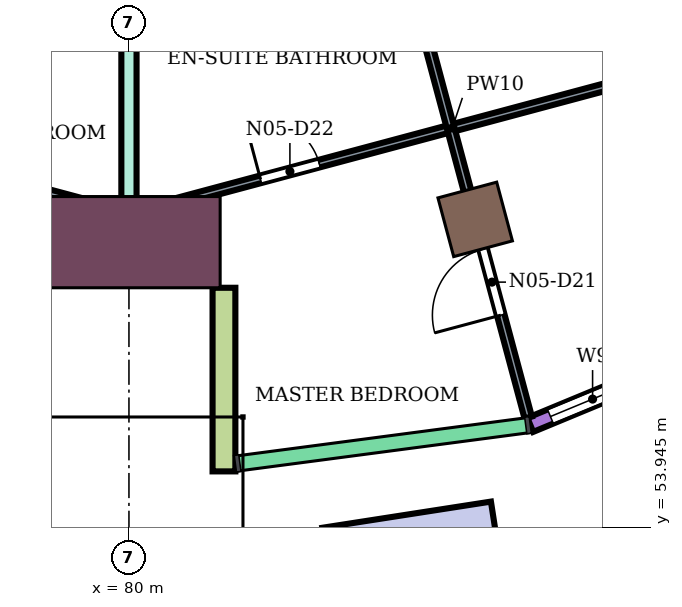
"""IFC4 building model, lengths in metres.
Left out: names, types, materials, properties, quantities, classifications, styles, units other than length and angle.
Written with IfcOpenShell. Run it as: python <this file> out.ifc"""

import sys

from ifc_helpers import new_model, si_unit, direction, frame, frame_2d, origin, origin_2d, place, context, subcontext, project, spatial, rectangle, extrude, element, fill, save


model = new_model("IFC4")
c1 = context("Model", 3, precision=1e-05, world=origin(), true_north=direction((0.0, 1.0)))
c2 = subcontext(c1, "Body", "Model", "MODEL_VIEW")
j1 = project(units=[si_unit("LENGTHUNIT", "METRE"), si_unit("PLANEANGLEUNIT", "RADIAN")], contexts=[c1])
p1 = place(None, origin())
s1 = spatial("IfcSite", under=j1, at=p1, CompositionType="ELEMENT")
p2 = place(p1, origin())
s2 = spatial("IfcBuilding", under=s1, at=p2, CompositionType="ELEMENT")
p3 = place(p2, frame((0.0, 0.0, 314.9)))
s3 = spatial("IfcBuildingStorey", under=s2, at=p3, CompositionType="ELEMENT", Elevation=314.9)
p4 = place(p3, frame((84.555, 58.0, 0.0), z_axis=(0.0, 0.0, 1.0), x_axis=(0.258819045103, -0.965925826289, 0.0)))
e1 = element("IfcColumn", 1, at=p4, inside=s3, PredefinedType="COLUMN", context=c2, shape_type="SweptSolid", body=[
    extrude(rectangle(XDim=0.8, YDim=0.8, at=origin_2d()), origin(), (0.0, 0.0, 1.0), 4.4),
])
p5 = place(p3, frame((80.0, 57.7, 0.0), z_axis=(0.0, 0.0, 1.0), x_axis=(0.0, -1.0, 0.0)))
e2 = element("IfcColumn", 2, at=p5, inside=s3, PredefinedType="COLUMN", context=c2, shape_type="SweptSolid", body=[
    extrude(rectangle(XDim=1.2, YDim=2.4, at=origin_2d()), origin(), (0.0, 0.0, 1.0), 4.4),
])
p6 = place(p3, frame((85.28, 55.296, 0.0), z_axis=(0.0, 0.0, 1.0), x_axis=(0.923876574156, 0.382690574388, 0.0)))
e3 = element("IfcWall", 3, at=p6, inside=s3, PredefinedType="NOTDEFINED", context=c2, shape_type="SweptSolid", body=[
    extrude(rectangle(XDim=5.325, YDim=0.2, at=frame_2d((2.663, 0.0))), origin(), (0.0, 0.0, 1.0), 4.4),
])
p7 = place(p6, frame((0.288, 0.0, 0.9)))
e4 = element("IfcOpeningElement", 4, at=p7, cuts=e3, PredefinedType="OPENING", context=c2, shape_type="SweptSolid", body=[
    extrude(rectangle(XDim=1.2, YDim=2.7, at=frame_2d((0.6, 1.35))), frame((0.0, 0.11, 0.0), z_axis=(0.0, -1.0, 0.0), x_axis=(1.0, 0.0, 0.0)), (0.0, 0.0, 1.0), 0.22),
])
p8 = place(p6, frame((1.763, 0.0, 0.0)))
e5 = element("IfcOpeningElement", 5, at=p8, cuts=e3, PredefinedType="OPENING", context=c2, shape_type="SweptSolid", body=[
    extrude(rectangle(XDim=1.8, YDim=2.7, at=frame_2d((0.9, 1.35))), frame((0.0, 0.11, 0.0), z_axis=(0.0, -1.0, 0.0), x_axis=(1.0, 0.0, 0.0)), (0.0, 0.0, 1.0), 0.22),
])
p9 = place(p6, frame((3.838, 0.0, 0.9)))
e6 = element("IfcOpeningElement", 6, at=p9, cuts=e3, PredefinedType="OPENING", context=c2, shape_type="SweptSolid", body=[
    extrude(rectangle(XDim=1.2, YDim=2.7, at=frame_2d((0.6, 1.35))), frame((0.0, 0.11, 0.0), z_axis=(0.0, -1.0, 0.0), x_axis=(1.0, 0.0, 0.0)), (0.0, 0.0, 1.0), 0.22),
])
p10 = place(p3, frame((81.25, 57.1, 0.0), z_axis=(0.0, 0.0, 1.0), x_axis=(0.0, -1.0, 0.0)))
e7 = element("IfcWall", 7, at=p10, inside=s3, PredefinedType="NOTDEFINED", context=c2, shape_type="SweptSolid", body=[
    extrude(rectangle(XDim=2.416, YDim=0.3, at=frame_2d((1.208, 0.0))), origin(), (0.0, 0.0, 1.0), 4.4),
])
p11 = place(p3, frame((82.59, 53.646, 0.0), z_axis=(0.0, 0.0, 1.0), x_axis=(0.988158273159, 0.153438023927, 0.0)))
e8 = element("IfcWall", 8, at=p11, inside=s3, PredefinedType="USERDEFINED", context=c2, shape_type="SweptSolid", body=[
    extrude(rectangle(XDim=2.245, YDim=0.6, at=frame_2d((1.123, 0.0))), origin(), (0.0, 0.0, 1.0), 0.6),
])
p12 = place(p3, frame((80.0, 57.3, 0.0), z_axis=(0.0, 0.0, 1.0), x_axis=(0.0, 1.0, 0.0)))
e9 = element("IfcWall", 9, at=p12, inside=s3, PredefinedType="PARTITIONING", context=c2, shape_type="SweptSolid", body=[
    extrude(rectangle(XDim=4.814, YDim=0.2, at=frame_2d((2.407, 0.0))), origin(), (0.0, 0.0, 1.0), 3.95),
])
p13 = place(p3, frame((75.862, 59.171, 0.0), z_axis=(0.0, 0.0, 1.0), x_axis=(0.965961623338, -0.258685411723, 0.0)))
e10 = element("IfcWall", 10, at=p13, inside=s3, PredefinedType="PARTITIONING", context=c2, shape_type="SweptSolid", body=[
    extrude(rectangle(XDim=4.174, YDim=0.1, at=frame_2d((2.087, 0.0))), origin(), (0.0, 0.0, 1.0), 3.95),
])
p14 = place(p13, frame((0.363, 0.0, 0.0)))
e11 = element("IfcOpeningElement", 11, at=p14, cuts=e10, PredefinedType="OPENING", context=c2, shape_type="SweptSolid", body=[
    extrude(rectangle(XDim=0.9, YDim=2.1, at=frame_2d((0.45, 1.05))), frame((0.0, 0.06, 0.0), z_axis=(0.0, -1.0, 0.0), x_axis=(1.0, 0.0, 0.0)), (0.0, 0.0, 1.0), 0.12),
])
p15 = place(p3, frame((80.106, 58.092, 0.0), z_axis=(0.0, 0.0, 1.0), x_axis=(0.965971139599, 0.258649874274, 0.0)))
e12 = element("IfcWall", 12, at=p15, inside=s3, PredefinedType="PARTITIONING", context=c2, shape_type="SweptSolid", body=[
    extrude(rectangle(XDim=8.588, YDim=0.1, at=frame_2d((4.294, 0.0))), origin(), (0.0, 0.0, 1.0), 3.95),
])
p16 = place(p15, frame((1.682, 0.0, 0.0)))
e13 = element("IfcOpeningElement", 13, at=p16, cuts=e12, PredefinedType="OPENING", context=c2, shape_type="SweptSolid", body=[
    extrude(rectangle(XDim=0.8, YDim=2.1, at=frame_2d((0.4, 1.05))), frame((0.0, 0.06, 0.0), z_axis=(0.0, -1.0, 0.0), x_axis=(1.0, 0.0, 0.0)), (0.0, 0.0, 1.0), 0.12),
])
p17 = place(p3, frame((83.224, 62.964, 0.0), z_axis=(0.0, 0.0, 1.0), x_axis=(0.258779160476, -0.96593651246, 0.0)))
e14 = element("IfcWall", 14, at=p17, inside=s3, PredefinedType="PARTITIONING", context=c2, shape_type="SweptSolid", body=[
    extrude(rectangle(XDim=7.838, YDim=0.1, at=frame_2d((3.919, 0.0))), origin(), (0.0, 0.0, 1.0), 3.95),
])
p18 = place(p17, frame((5.544, 0.0, 0.0)))
e15 = element("IfcOpeningElement", 15, at=p18, cuts=e14, PredefinedType="OPENING", context=c2, shape_type="SweptSolid", body=[
    extrude(rectangle(XDim=0.9, YDim=2.1, at=frame_2d((0.45, 1.05))), frame((0.0, 0.06, 0.0), z_axis=(0.0, -1.0, 0.0), x_axis=(1.0, 0.0, 0.0)), (0.0, 0.0, 1.0), 0.12),
])
p19 = place(p7, origin())
e16 = element("IfcWindow", 16, at=p19, inside=s3, PartitioningType="SINGLE_PANEL", PredefinedType="WINDOW", context=c2, shape_type="SweptSolid", body=[
    extrude(rectangle(XDim=1.2, YDim=2.7, at=frame_2d((0.6, 1.35))), frame((0.0, 0.03, 0.0), z_axis=(0.0, -1.0, 0.0), x_axis=(1.0, 0.0, 0.0)), (0.0, 0.0, 1.0), 0.06),
])
fill(e4, e16)
p20 = place(p18, frame((0.9, 0.0, 0.0), z_axis=(0.0, 0.0, 1.0), x_axis=(-1.0, 0.0, 0.0)))
e17 = element("IfcDoor", 17, at=p20, inside=s3, OperationType="SINGLE_SWING_LEFT", PredefinedType="DOOR", context=c2, shape_type="SweptSolid", body=[
    extrude(rectangle(XDim=0.9, YDim=2.1, at=frame_2d((0.45, 1.05))), frame((0.0, 0.025, 0.0), z_axis=(0.0, -1.0, 0.0), x_axis=(1.0, 0.0, 0.0)), (0.0, 0.0, 1.0), 0.05),
])
fill(e15, e17)
p21 = place(p16, origin())
e18 = element("IfcDoor", 18, at=p21, inside=s3, OperationType="SINGLE_SWING_LEFT", PredefinedType="DOOR", context=c2, shape_type="SweptSolid", body=[
    extrude(rectangle(XDim=0.8, YDim=2.1, at=frame_2d((0.4, 1.05))), frame((0.0, 0.025, 0.0), z_axis=(0.0, -1.0, 0.0), x_axis=(1.0, 0.0, 0.0)), (0.0, 0.0, 1.0), 0.05),
])
fill(e13, e18)
save(model, sys.argv[1])
